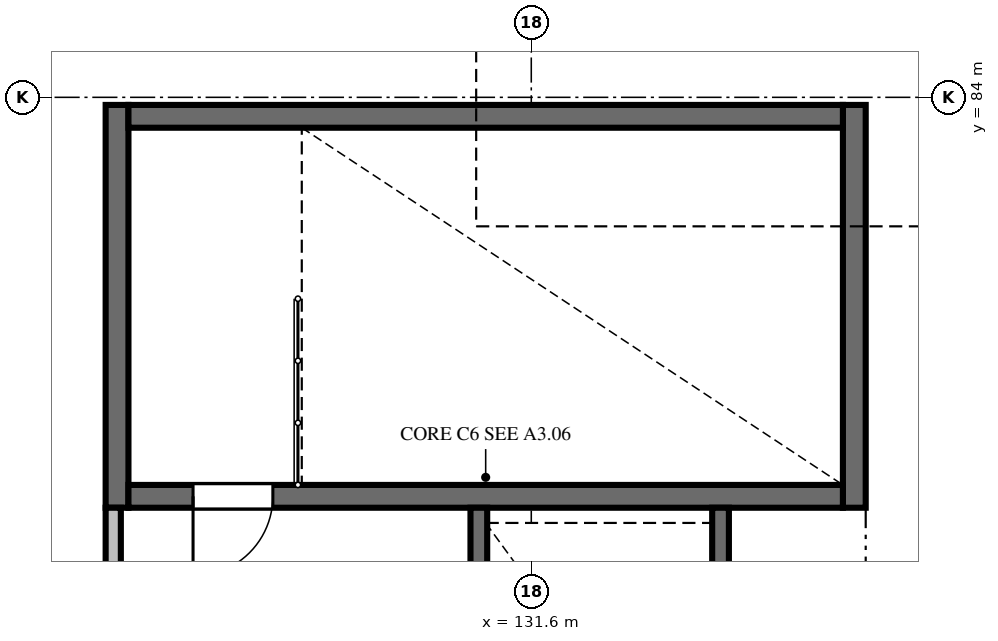
"""IFC4 building model, lengths in metres.
Left out: names, types, materials, properties, quantities, classifications, styles, units other than length and angle.
Written with IfcOpenShell. Run it as: python <this file> out.ifc"""

import sys

from ifc_helpers import new_model, si_unit, direction, frame, frame_2d, origin, place, context, subcontext, project, spatial, rectangle, extrude, element, fill, save


model = new_model("IFC4")
c1 = context("Model", 3, precision=1e-05, world=origin(), true_north=direction((0.0, 1.0)))
c2 = subcontext(c1, "Body", "Model", "MODEL_VIEW")
j1 = project(units=[si_unit("LENGTHUNIT", "METRE"), si_unit("PLANEANGLEUNIT", "RADIAN")], contexts=[c1])
p1 = place(None, origin())
s1 = spatial("IfcSite", under=j1, at=p1, CompositionType="ELEMENT")
p2 = place(p1, origin())
s2 = spatial("IfcBuilding", under=s1, at=p2, CompositionType="ELEMENT")
p3 = place(p2, frame((0.0, 0.0, 16.8)))
s3 = spatial("IfcBuildingStorey", under=s2, at=p3, CompositionType="ELEMENT", Elevation=16.8)
for number, where, z_axis, x_axis in (
    (1, (126.15, 78.6, 0.0), (0.0, 0.0, 1.0), (0.0, 1.0, 0.0)),
    (2, (135.85, 83.9, 0.0), (0.0, 0.0, 1.0), (0.0, -1.0, 0.0)),
):
    element("IfcWall", number, at=place(p3, frame(where, z_axis=z_axis, x_axis=x_axis)), inside=s3, PredefinedType="SHEAR", context=c2, shape_type="SweptSolid", body=[
        extrude(rectangle(XDim=5.3, YDim=0.3, at=frame_2d((2.65, 0.0))), origin(), (0.0, 0.0, 1.0), 5.12),
    ])
p4 = place(p3, frame((135.7, 78.75, 0.0), z_axis=(0.0, 0.0, 1.0), x_axis=(-1.0, 0.0, 0.0)))
e3 = element("IfcWall", 3, at=p4, inside=s3, PredefinedType="SHEAR", context=c2, shape_type="SweptSolid", body=[
    extrude(rectangle(XDim=9.4, YDim=0.3, at=frame_2d((4.7, 0.0))), origin(), (0.0, 0.0, 1.0), 5.12),
])
p5 = place(p4, frame((7.5, 0.0, 0.0)))
e4 = element("IfcOpeningElement", 4, at=p5, cuts=e3, PredefinedType="OPENING", context=c2, shape_type="SweptSolid", body=[
    extrude(rectangle(XDim=1.05, YDim=2.2, at=frame_2d((0.525, 1.1))), frame((0.0, 0.16, 0.0), z_axis=(0.0, -1.0, 0.0), x_axis=(1.0, 0.0, 0.0)), (0.0, 0.0, 1.0), 0.32),
])
p6 = place(p3, frame((126.3, 83.75, 0.0), z_axis=(0.0, 0.0, 1.0), x_axis=(1.0, 0.0, 0.0)))
e5 = element("IfcWall", 5, at=p6, inside=s3, PredefinedType="SHEAR", context=c2, shape_type="SweptSolid", body=[
    extrude(rectangle(XDim=9.4, YDim=0.3, at=frame_2d((4.7, 0.0))), origin(), (0.0, 0.0, 1.0), 5.12),
])
p7 = place(p3, frame((126.1, 74.1, 0.0), z_axis=(0.0, 0.0, 1.0), x_axis=(0.0, 1.0, 0.0)))
e6 = element("IfcWall", 6, at=p7, inside=s3, PredefinedType="SOLIDWALL", context=c2, shape_type="SweptSolid", body=[
    extrude(rectangle(XDim=4.5, YDim=0.2, at=frame_2d((2.25, 0.0))), origin(), (0.0, 0.0, 1.0), 5.05),
])
p8 = place(p3, frame((130.91, 74.1, 0.0), z_axis=(0.0, 0.0, 1.0), x_axis=(0.0, 1.0, 0.0)))
e7 = element("IfcWall", 7, at=p8, inside=s3, PredefinedType="SOLIDWALL", context=c2, shape_type="SweptSolid", body=[
    extrude(rectangle(XDim=4.5, YDim=0.22, at=frame_2d((2.25, 0.0))), origin(), (0.0, 0.0, 1.0), 5.12),
])
p9 = place(p8, frame((1.65, 0.0, 0.0)))
e8 = element("IfcOpeningElement", 8, at=p9, cuts=e7, PredefinedType="OPENING", context=c2, shape_type="SweptSolid", body=[
    extrude(rectangle(XDim=1.2, YDim=2.2, at=frame_2d((0.6, 1.1))), frame((0.0, 0.12, 0.0), z_axis=(0.0, -1.0, 0.0), x_axis=(1.0, 0.0, 0.0)), (0.0, 0.0, 1.0), 0.24),
])
p10 = place(p3, frame((134.09, 74.1, 0.0), z_axis=(0.0, 0.0, 1.0), x_axis=(0.0, 1.0, 0.0)))
e9 = element("IfcWall", 9, at=p10, inside=s3, PredefinedType="SOLIDWALL", context=c2, shape_type="SweptSolid", body=[
    extrude(rectangle(XDim=4.5, YDim=0.22, at=frame_2d((2.25, 0.0))), origin(), (0.0, 0.0, 1.0), 5.12),
])
p11 = place(p5, origin())
e10 = element("IfcDoor", 10, at=p11, inside=s3, OperationType="SINGLE_SWING_RIGHT", PredefinedType="DOOR", context=c2, shape_type="SweptSolid", body=[
    extrude(rectangle(XDim=1.05, YDim=2.2, at=frame_2d((0.525, 1.1))), frame((0.0, 0.025, 0.0), z_axis=(0.0, -1.0, 0.0), x_axis=(1.0, 0.0, 0.0)), (0.0, 0.0, 1.0), 0.05),
])
fill(e4, e10)
save(model, sys.argv[1])
